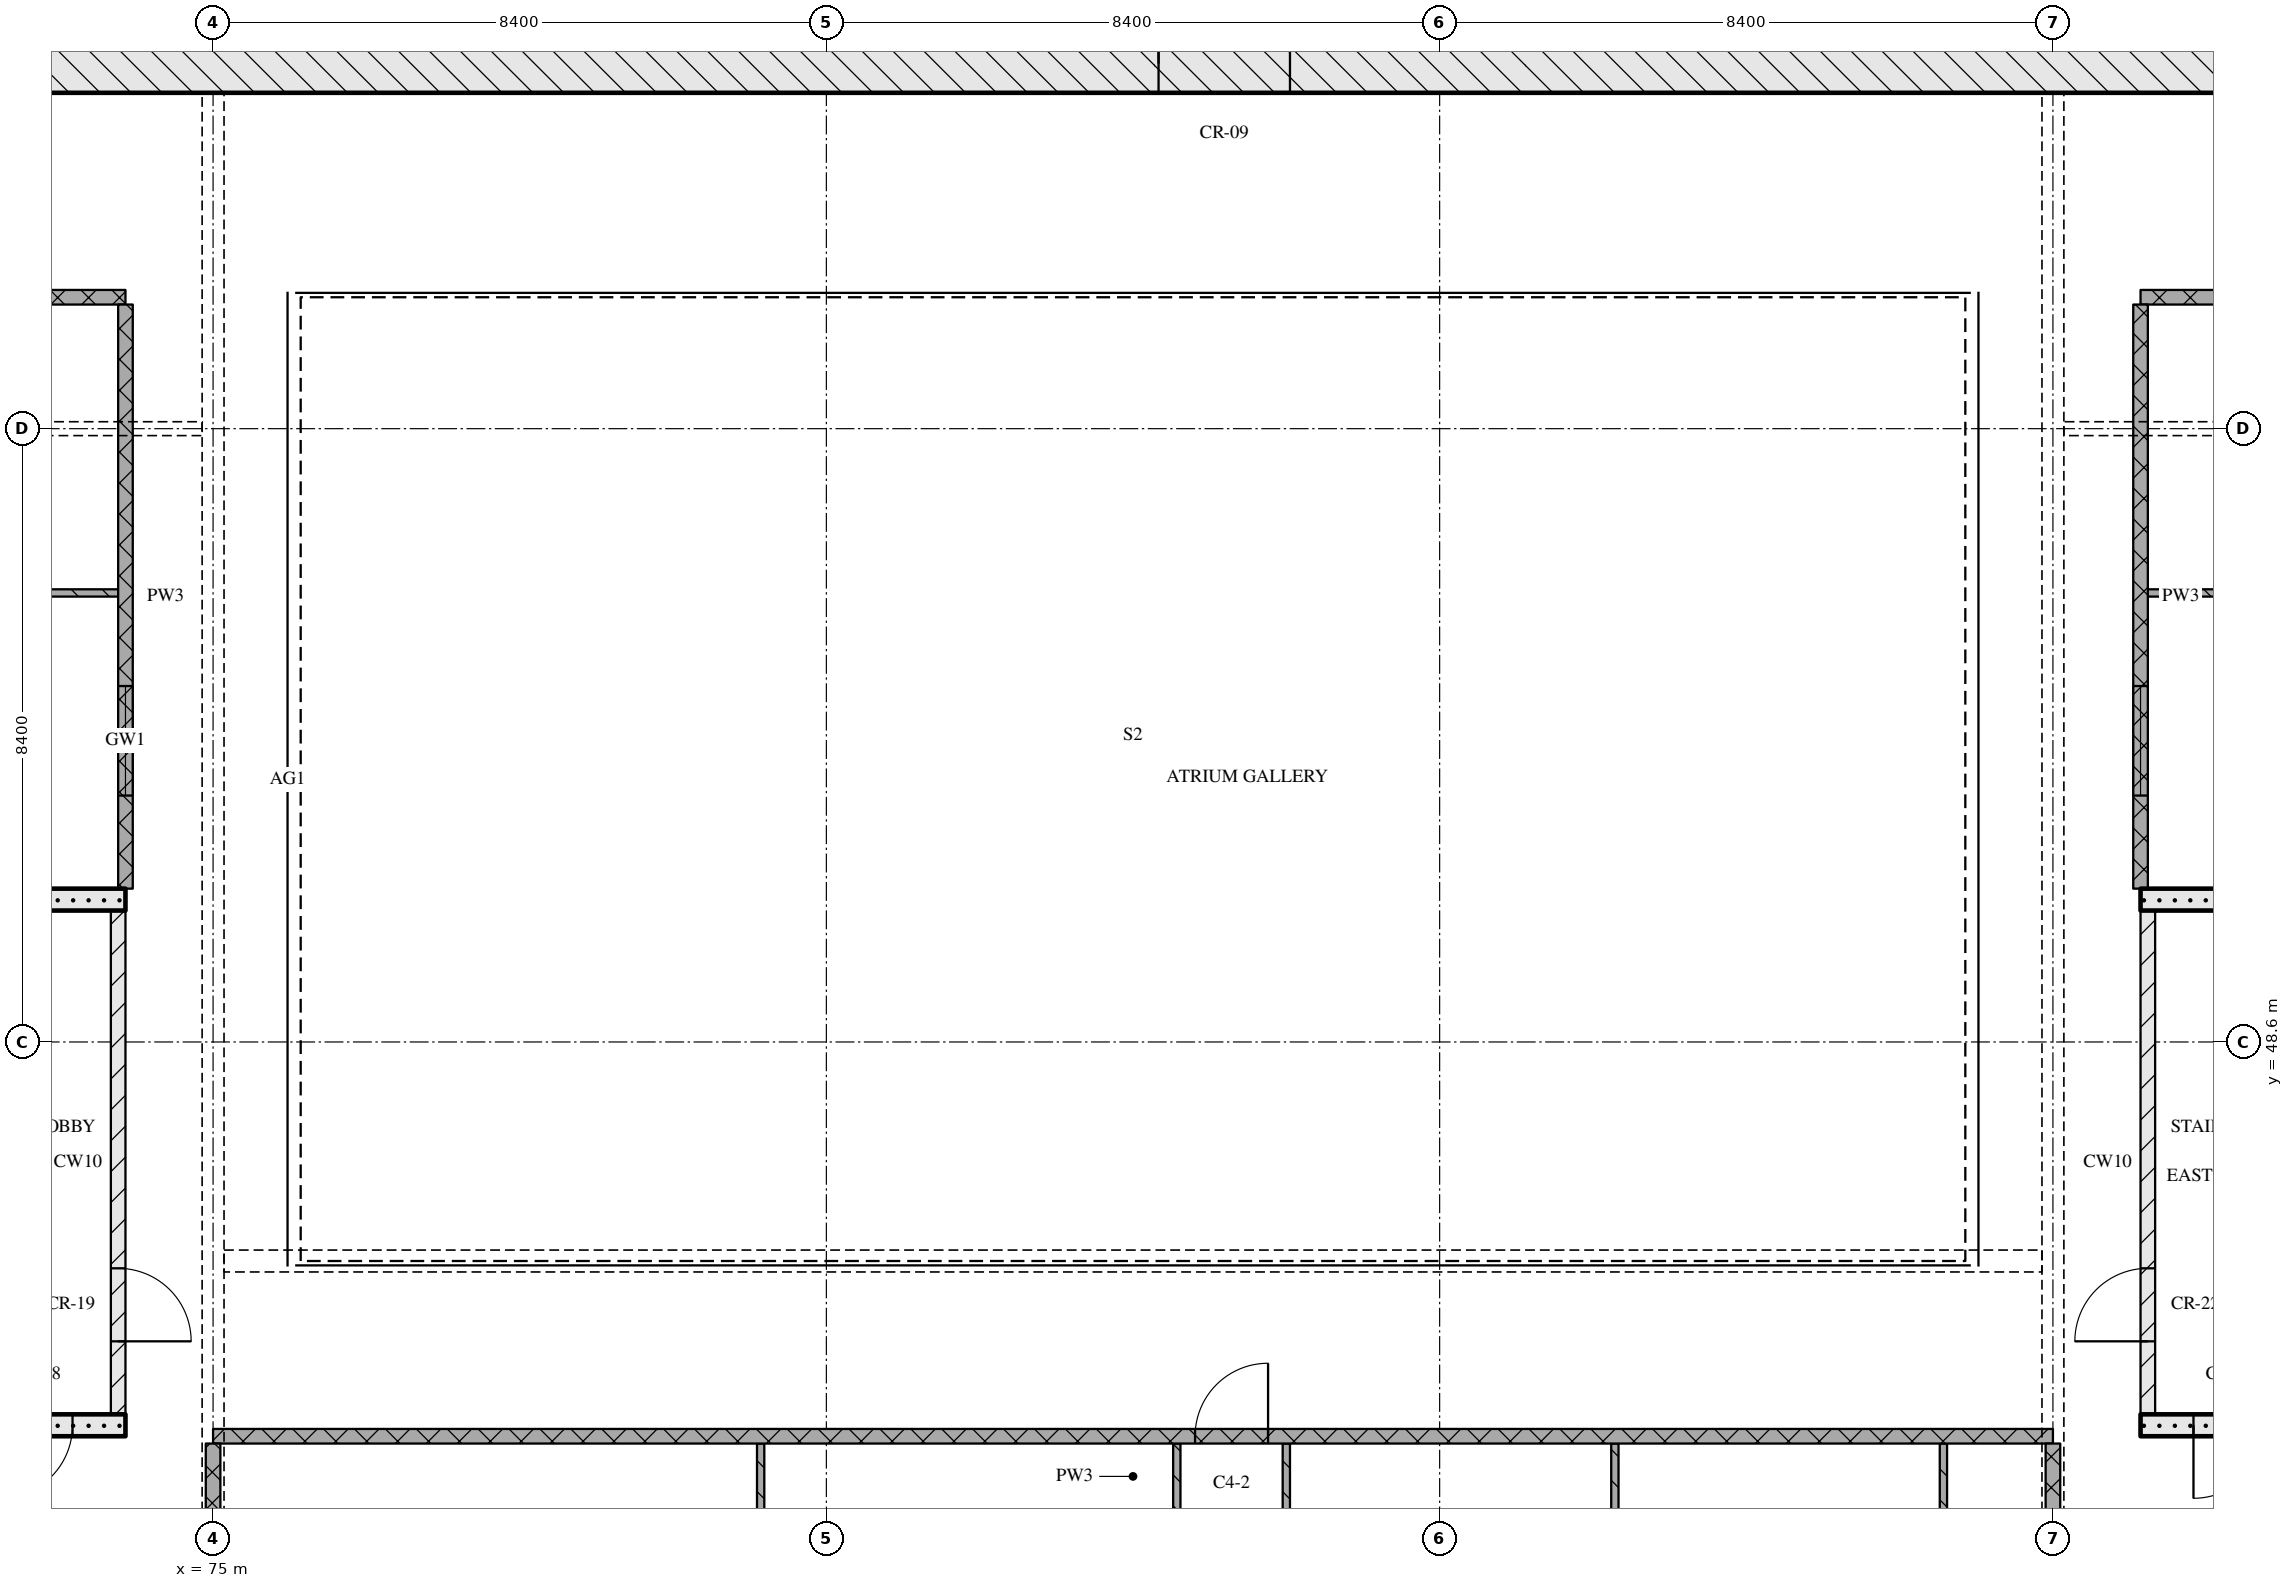
"""IFC4 building model, lengths in metres.
Left out: names, types, materials, properties, quantities, classifications, styles, units other than length and angle.
Written with IfcOpenShell. Run it as: python <this file> out.ifc"""

import sys

from ifc_helpers import new_model, si_unit, direction, frame, frame_2d, origin, place, context, subcontext, project, spatial, rectangle, extrude, element, fill, save


model = new_model("IFC4")
c1 = context("Model", 3, precision=1e-05, world=origin(), true_north=direction((0.0, 1.0)))
c2 = subcontext(c1, "Body", "Model", "MODEL_VIEW")
j1 = project(units=[si_unit("LENGTHUNIT", "METRE"), si_unit("PLANEANGLEUNIT", "RADIAN")], contexts=[c1])
p1 = place(None, origin())
s1 = spatial("IfcSite", under=j1, at=p1, CompositionType="ELEMENT")
p2 = place(p1, origin())
s2 = spatial("IfcBuilding", under=s1, at=p2, CompositionType="ELEMENT")
p3 = place(p2, frame((0.0, 0.0, 183.45)))
s3 = spatial("IfcBuildingStorey", under=s2, at=p3, CompositionType="ELEMENT", Elevation=183.45)
p4 = place(p3, frame((67.0, 62.0, 0.0), z_axis=(0.0, 0.0, 1.0), x_axis=(1.0, 0.0, 0.0)))
e1 = element("IfcWall", 1, at=p4, inside=s3, PredefinedType="SOLIDWALL", context=c2, shape_type="SweptSolid", body=[
    extrude(rectangle(XDim=41.2, YDim=0.8, at=frame_2d((20.6, 0.0))), origin(), (0.0, 0.0, 1.0), 3.32),
])
p5 = place(p4, frame((20.95, 0.0, 0.0)))
e2 = element("IfcOpeningElement", 2, at=p5, cuts=e1, PredefinedType="OPENING", context=c2, shape_type="SweptSolid", body=[
    extrude(rectangle(XDim=1.8, YDim=2.1, at=frame_2d((0.9, 1.05))), frame((0.0, 0.41, 0.0), z_axis=(0.0, -1.0, 0.0), x_axis=(1.0, 0.0, 0.0)), (0.0, 0.0, 1.0), 0.82),
])
p6 = place(p3, frame((68.2, 43.35, 0.0), z_axis=(0.0, 0.0, 1.0), x_axis=(1.0, 0.0, 0.0)))
e3 = element("IfcWall", 3, at=p6, inside=s3, PredefinedType="SOLIDWALL", context=c2, shape_type="SweptSolid", body=[
    extrude(rectangle(XDim=5.6, YDim=0.3, at=frame_2d((2.8, 0.0))), origin(), (0.0, 0.0, 1.0), 3.32),
])
p7 = place(p6, frame((3.875, 0.0, 0.0)))
e4 = element("IfcOpeningElement", 4, at=p7, cuts=e3, PredefinedType="OPENING", context=c2, shape_type="SweptSolid", body=[
    extrude(rectangle(XDim=1.0, YDim=2.1, at=frame_2d((0.5, 1.05))), frame((0.0, 0.16, 0.0), z_axis=(0.0, -1.0, 0.0), x_axis=(1.0, 0.0, 0.0)), (0.0, 0.0, 1.0), 0.32),
])
p8 = place(p3, frame((73.7, 43.5, 0.0), z_axis=(0.0, 0.0, 1.0), x_axis=(0.0, 1.0, 0.0)))
e5 = element("IfcWall", 5, at=p8, inside=s3, PredefinedType="PARTITIONING", context=c2, shape_type="SweptSolid", body=[
    extrude(rectangle(XDim=6.9, YDim=0.2, at=frame_2d((3.45, 0.0))), origin(), (0.0, 0.0, 1.0), 3.32),
])
p9 = place(p8, frame((1.0, 0.0, 0.0)))
e6 = element("IfcOpeningElement", 6, at=p9, cuts=e5, PredefinedType="OPENING", context=c2, shape_type="SweptSolid", body=[
    extrude(rectangle(XDim=1.0, YDim=2.1, at=frame_2d((0.5, 1.05))), frame((0.0, 0.11, 0.0), z_axis=(0.0, -1.0, 0.0), x_axis=(1.0, 0.0, 0.0)), (0.0, 0.0, 1.0), 0.22),
])
p10 = place(p3, frame((68.2, 50.55, 0.0), z_axis=(0.0, 0.0, 1.0), x_axis=(1.0, 0.0, 0.0)))
e7 = element("IfcWall", 7, at=p10, inside=s3, PredefinedType="SOLIDWALL", context=c2, shape_type="SweptSolid", body=[
    extrude(rectangle(XDim=5.6, YDim=0.3, at=frame_2d((2.8, 0.0))), origin(), (0.0, 0.0, 1.0), 3.32),
])
p11 = place(p3, frame((101.4, 43.35, 0.0), z_axis=(0.0, 0.0, 1.0), x_axis=(1.0, 0.0, 0.0)))
e8 = element("IfcWall", 8, at=p11, inside=s3, PredefinedType="SOLIDWALL", context=c2, shape_type="SweptSolid", body=[
    extrude(rectangle(XDim=5.6, YDim=0.3, at=frame_2d((2.8, 0.0))), origin(), (0.0, 0.0, 1.0), 3.32),
])
p12 = place(p11, frame((0.725, 0.0, 0.0)))
e9 = element("IfcOpeningElement", 9, at=p12, cuts=e8, PredefinedType="OPENING", context=c2, shape_type="SweptSolid", body=[
    extrude(rectangle(XDim=1.0, YDim=2.1, at=frame_2d((0.5, 1.05))), frame((0.0, 0.16, 0.0), z_axis=(0.0, -1.0, 0.0), x_axis=(1.0, 0.0, 0.0)), (0.0, 0.0, 1.0), 0.32),
])
p13 = place(p3, frame((101.5, 43.5, 0.0), z_axis=(0.0, 0.0, 1.0), x_axis=(0.0, 1.0, 0.0)))
e10 = element("IfcWall", 10, at=p13, inside=s3, PredefinedType="PARTITIONING", context=c2, shape_type="SweptSolid", body=[
    extrude(rectangle(XDim=6.9, YDim=0.2, at=frame_2d((3.45, 0.0))), origin(), (0.0, 0.0, 1.0), 3.32),
])
p14 = place(p13, frame((1.0, 0.0, 0.0)))
e11 = element("IfcOpeningElement", 11, at=p14, cuts=e10, PredefinedType="OPENING", context=c2, shape_type="SweptSolid", body=[
    extrude(rectangle(XDim=1.0, YDim=2.1, at=frame_2d((0.5, 1.05))), frame((0.0, 0.11, 0.0), z_axis=(0.0, -1.0, 0.0), x_axis=(1.0, 0.0, 0.0)), (0.0, 0.0, 1.0), 0.22),
])
p15 = place(p3, frame((101.4, 50.55, 0.0), z_axis=(0.0, 0.0, 1.0), x_axis=(1.0, 0.0, 0.0)))
e12 = element("IfcWall", 12, at=p15, inside=s3, PredefinedType="SOLIDWALL", context=c2, shape_type="SweptSolid", body=[
    extrude(rectangle(XDim=5.6, YDim=0.3, at=frame_2d((2.8, 0.0))), origin(), (0.0, 0.0, 1.0), 3.32),
])
p16 = place(p3, frame((100.2, 43.2, 0.0), z_axis=(0.0, 0.0, 1.0), x_axis=(-1.0, 0.0, 0.0)))
e13 = element("IfcWall", 13, at=p16, inside=s3, PredefinedType="PARTITIONING", context=c2, shape_type="SweptSolid", body=[
    extrude(rectangle(XDim=25.2, YDim=0.2, at=frame_2d((12.6, 0.0))), origin(), (0.0, 0.0, 1.0), 3.32),
])
p17 = place(p16, frame((10.75, 0.0, 0.0)))
e14 = element("IfcOpeningElement", 14, at=p17, cuts=e13, PredefinedType="OPENING", context=c2, shape_type="SweptSolid", body=[
    extrude(rectangle(XDim=1.0, YDim=2.1, at=frame_2d((0.5, 1.05))), frame((0.0, 0.11, 0.0), z_axis=(0.0, -1.0, 0.0), x_axis=(1.0, 0.0, 0.0)), (0.0, 0.0, 1.0), 0.22),
])
p18 = place(p3, frame((73.7, 54.75, 0.0), z_axis=(0.0, 0.0, 1.0), x_axis=(-1.0, 0.0, 0.0)))
e15 = element("IfcWall", 15, at=p18, inside=s3, PredefinedType="PARTITIONING", context=c2, shape_type="SweptSolid", body=[
    extrude(rectangle(XDim=6.2, YDim=0.1, at=frame_2d((3.1, 0.0))), origin(), (0.0, 0.0, 1.0), 3.32),
])
p19 = place(p18, frame((2.6, 0.0, 0.0)))
e16 = element("IfcOpeningElement", 16, at=p19, cuts=e15, PredefinedType="OPENING", context=c2, shape_type="SweptSolid", body=[
    extrude(rectangle(XDim=0.9, YDim=2.1, at=frame_2d((0.45, 1.05))), frame((0.0, 0.06, 0.0), z_axis=(0.0, -1.0, 0.0), x_axis=(1.0, 0.0, 0.0)), (0.0, 0.0, 1.0), 0.12),
])
p20 = place(p3, frame((101.5, 54.75, 0.0), z_axis=(0.0, 0.0, 1.0), x_axis=(1.0, 0.0, 0.0)))
e17 = element("IfcWall", 17, at=p20, inside=s3, PredefinedType="PARTITIONING", context=c2, shape_type="SweptSolid", body=[
    extrude(rectangle(XDim=6.2, YDim=0.1, at=frame_2d((3.1, 0.0))), origin(), (0.0, 0.0, 1.0), 3.32),
])
p21 = place(p3, frame((63.0, 58.8, 0.0), z_axis=(0.0, 0.0, 1.0), x_axis=(1.0, 0.0, 0.0)))
e18 = element("IfcWall", 18, at=p21, inside=s3, PredefinedType="PARTITIONING", context=c2, shape_type="SweptSolid", body=[
    extrude(rectangle(XDim=10.8, YDim=0.2, at=frame_2d((5.4, 0.0))), origin(), (0.0, 0.0, 1.0), 3.32),
])
p22 = place(p3, frame((112.2, 58.8, 0.0), z_axis=(0.0, 0.0, 1.0), x_axis=(-1.0, 0.0, 0.0)))
e19 = element("IfcWall", 19, at=p22, inside=s3, PredefinedType="PARTITIONING", context=c2, shape_type="SweptSolid", body=[
    extrude(rectangle(XDim=10.8, YDim=0.2, at=frame_2d((5.4, 0.0))), origin(), (0.0, 0.0, 1.0), 3.32),
])
p23 = place(p22, frame((2.85, 0.0, 0.0)))
e20 = element("IfcOpeningElement", 20, at=p23, cuts=e19, PredefinedType="OPENING", context=c2, shape_type="SweptSolid", body=[
    extrude(rectangle(XDim=1.0, YDim=2.1, at=frame_2d((0.5, 1.05))), frame((0.0, 0.11, 0.0), z_axis=(0.0, -1.0, 0.0), x_axis=(1.0, 0.0, 0.0)), (0.0, 0.0, 1.0), 0.22),
])
p24 = place(p3, frame((73.8, 58.7, 0.0), z_axis=(0.0, 0.0, 1.0), x_axis=(0.0, -1.0, 0.0)))
e21 = element("IfcWall", 21, at=p24, inside=s3, PredefinedType="PARTITIONING", context=c2, shape_type="SweptSolid", body=[
    extrude(rectangle(XDim=8.0, YDim=0.2, at=frame_2d((4.0, 0.0))), origin(), (0.0, 0.0, 1.0), 3.32),
])
p25 = place(p24, frame((5.225, 0.0, 0.9)))
e22 = element("IfcOpeningElement", 22, at=p25, cuts=e21, PredefinedType="OPENING", context=c2, shape_type="SweptSolid", body=[
    extrude(rectangle(XDim=1.5, YDim=1.5, at=frame_2d((0.75, 0.75))), frame((0.0, 0.11, 0.0), z_axis=(0.0, -1.0, 0.0), x_axis=(1.0, 0.0, 0.0)), (0.0, 0.0, 1.0), 0.22),
])
p26 = place(p3, frame((75.0, 43.1, 0.0), z_axis=(0.0, 0.0, 1.0), x_axis=(0.0, -1.0, 0.0)))
e23 = element("IfcWall", 23, at=p26, inside=s3, PredefinedType="PARTITIONING", context=c2, shape_type="SweptSolid", body=[
    extrude(rectangle(XDim=2.2, YDim=0.2, at=frame_2d((1.1, 0.0))), origin(), (0.0, 0.0, 1.0), 2.43),
])
p27 = place(p3, frame((82.5, 43.1, 0.0), z_axis=(0.0, 0.0, 1.0), x_axis=(0.0, -1.0, 0.0)))
e24 = element("IfcWall", 24, at=p27, inside=s3, PredefinedType="PARTITIONING", context=c2, shape_type="SweptSolid", body=[
    extrude(rectangle(XDim=4.95, YDim=0.1, at=frame_2d((2.475, 0.0))), origin(), (0.0, 0.0, 1.0), 3.32),
])
p28 = place(p3, frame((88.2, 38.15, 0.0), z_axis=(0.0, 0.0, 1.0), x_axis=(0.0, 1.0, 0.0)))
e25 = element("IfcWall", 25, at=p28, inside=s3, PredefinedType="PARTITIONING", context=c2, shape_type="SweptSolid", body=[
    extrude(rectangle(XDim=4.95, YDim=0.1, at=frame_2d((2.475, 0.0))), origin(), (0.0, 0.0, 1.0), 3.32),
])
p29 = place(p28, frame((2.05, 0.0, 0.0)))
e26 = element("IfcOpeningElement", 26, at=p29, cuts=e25, PredefinedType="OPENING", context=c2, shape_type="SweptSolid", body=[
    extrude(rectangle(XDim=0.9, YDim=2.1, at=frame_2d((0.45, 1.05))), frame((0.0, 0.06, 0.0), z_axis=(0.0, -1.0, 0.0), x_axis=(1.0, 0.0, 0.0)), (0.0, 0.0, 1.0), 0.12),
])
p30 = place(p3, frame((89.7, 43.1, 0.0), z_axis=(0.0, 0.0, 1.0), x_axis=(0.0, -1.0, 0.0)))
e27 = element("IfcWall", 27, at=p30, inside=s3, PredefinedType="PARTITIONING", context=c2, shape_type="SweptSolid", body=[
    extrude(rectangle(XDim=4.95, YDim=0.1, at=frame_2d((2.475, 0.0))), origin(), (0.0, 0.0, 1.0), 3.32),
])
p31 = place(p30, frame((2.05, 0.0, 0.0)))
e28 = element("IfcOpeningElement", 28, at=p31, cuts=e27, PredefinedType="OPENING", context=c2, shape_type="SweptSolid", body=[
    extrude(rectangle(XDim=0.8, YDim=2.1, at=frame_2d((0.4, 1.05))), frame((0.0, 0.06, 0.0), z_axis=(0.0, -1.0, 0.0), x_axis=(1.0, 0.0, 0.0)), (0.0, 0.0, 1.0), 0.12),
])
for number, where, z_axis, x_axis in (
    (29, (94.2, 43.1, 0.0), (0.0, 0.0, 1.0), (0.0, -1.0, 0.0)),
    (30, (98.7, 43.1, 0.0), (0.0, 0.0, 1.0), (0.0, -1.0, 0.0)),
):
    element("IfcWall", number, at=place(p3, frame(where, z_axis=z_axis, x_axis=x_axis)), inside=s3, PredefinedType="PARTITIONING", context=c2, shape_type="SweptSolid", body=[
        extrude(rectangle(XDim=4.95, YDim=0.1, at=frame_2d((2.475, 0.0))), origin(), (0.0, 0.0, 1.0), 3.32),
    ])
p32 = place(p3, frame((100.2, 43.1, 0.0), z_axis=(0.0, 0.0, 1.0), x_axis=(0.0, -1.0, 0.0)))
e31 = element("IfcWall", 31, at=p32, inside=s3, PredefinedType="PARTITIONING", context=c2, shape_type="SweptSolid", body=[
    extrude(rectangle(XDim=2.2, YDim=0.2, at=frame_2d((1.1, 0.0))), origin(), (0.0, 0.0, 1.0), 2.43),
])
p33 = place(p3, frame((101.4, 58.7, 0.0), z_axis=(0.0, 0.0, 1.0), x_axis=(0.0, -1.0, 0.0)))
e32 = element("IfcWall", 32, at=p33, inside=s3, PredefinedType="PARTITIONING", context=c2, shape_type="SweptSolid", body=[
    extrude(rectangle(XDim=8.0, YDim=0.2, at=frame_2d((4.0, 0.0))), origin(), (0.0, 0.0, 1.0), 3.32),
])
p34 = place(p33, frame((5.225, 0.0, 0.9)))
e33 = element("IfcOpeningElement", 33, at=p34, cuts=e32, PredefinedType="OPENING", context=c2, shape_type="SweptSolid", body=[
    extrude(rectangle(XDim=1.5, YDim=1.5, at=frame_2d((0.75, 0.75))), frame((0.0, 0.11, 0.0), z_axis=(0.0, -1.0, 0.0), x_axis=(1.0, 0.0, 0.0)), (0.0, 0.0, 1.0), 0.22),
])
p35 = place(p5, origin())
e34 = element("IfcDoor", 34, at=p35, inside=s3, OperationType="DOUBLE_DOOR_SINGLE_SWING", PredefinedType="DOOR", context=c2, shape_type="SweptSolid", body=[
    extrude(rectangle(XDim=1.8, YDim=2.1, at=frame_2d((0.9, 1.05))), frame((0.0, 0.025, 0.0), z_axis=(0.0, -1.0, 0.0), x_axis=(1.0, 0.0, 0.0)), (0.0, 0.0, 1.0), 0.05),
])
fill(e2, e34)
p36 = place(p7, origin())
e35 = element("IfcDoor", 35, at=p36, inside=s3, OperationType="SINGLE_SWING_RIGHT", PredefinedType="DOOR", context=c2, shape_type="SweptSolid", body=[
    extrude(rectangle(XDim=1.0, YDim=2.1, at=frame_2d((0.5, 1.05))), frame((0.0, 0.025, 0.0), z_axis=(0.0, -1.0, 0.0), x_axis=(1.0, 0.0, 0.0)), (0.0, 0.0, 1.0), 0.05),
])
fill(e4, e35)
p37 = place(p9, origin())
e36 = element("IfcDoor", 36, at=p37, inside=s3, OperationType="SINGLE_SWING_RIGHT", PredefinedType="DOOR", context=c2, shape_type="SweptSolid", body=[
    extrude(rectangle(XDim=1.0, YDim=2.1, at=frame_2d((0.5, 1.05))), frame((0.0, 0.025, 0.0), z_axis=(0.0, -1.0, 0.0), x_axis=(1.0, 0.0, 0.0)), (0.0, 0.0, 1.0), 0.05),
])
fill(e6, e36)
p38 = place(p12, origin())
e37 = element("IfcDoor", 37, at=p38, inside=s3, OperationType="SINGLE_SWING_RIGHT", PredefinedType="DOOR", context=c2, shape_type="SweptSolid", body=[
    extrude(rectangle(XDim=1.0, YDim=2.1, at=frame_2d((0.5, 1.05))), frame((0.0, 0.025, 0.0), z_axis=(0.0, -1.0, 0.0), x_axis=(1.0, 0.0, 0.0)), (0.0, 0.0, 1.0), 0.05),
])
fill(e9, e37)
p39 = place(p14, origin())
e38 = element("IfcDoor", 38, at=p39, inside=s3, OperationType="SINGLE_SWING_LEFT", PredefinedType="DOOR", context=c2, shape_type="SweptSolid", body=[
    extrude(rectangle(XDim=1.0, YDim=2.1, at=frame_2d((0.5, 1.05))), frame((0.0, 0.025, 0.0), z_axis=(0.0, -1.0, 0.0), x_axis=(1.0, 0.0, 0.0)), (0.0, 0.0, 1.0), 0.05),
])
fill(e11, e38)
p40 = place(p17, origin())
e39 = element("IfcDoor", 39, at=p40, inside=s3, OperationType="SINGLE_SWING_RIGHT", PredefinedType="DOOR", context=c2, shape_type="SweptSolid", body=[
    extrude(rectangle(XDim=1.0, YDim=2.1, at=frame_2d((0.5, 1.05))), frame((0.0, 0.025, 0.0), z_axis=(0.0, -1.0, 0.0), x_axis=(1.0, 0.0, 0.0)), (0.0, 0.0, 1.0), 0.05),
])
fill(e14, e39)
p41 = place(p25, origin())
e40 = element("IfcWindow", 40, at=p41, inside=s3, PartitioningType="SINGLE_PANEL", PredefinedType="WINDOW", context=c2, shape_type="SweptSolid", body=[
    extrude(rectangle(XDim=1.5, YDim=1.5, at=frame_2d((0.75, 0.75))), frame((0.0, 0.03, 0.0), z_axis=(0.0, -1.0, 0.0), x_axis=(1.0, 0.0, 0.0)), (0.0, 0.0, 1.0), 0.06),
])
fill(e22, e40)
p42 = place(p34, origin())
e41 = element("IfcWindow", 41, at=p42, inside=s3, PartitioningType="SINGLE_PANEL", PredefinedType="WINDOW", context=c2, shape_type="SweptSolid", body=[
    extrude(rectangle(XDim=1.5, YDim=1.5, at=frame_2d((0.75, 0.75))), frame((0.0, 0.03, 0.0), z_axis=(0.0, -1.0, 0.0), x_axis=(1.0, 0.0, 0.0)), (0.0, 0.0, 1.0), 0.06),
])
fill(e33, e41)
save(model, sys.argv[1])
